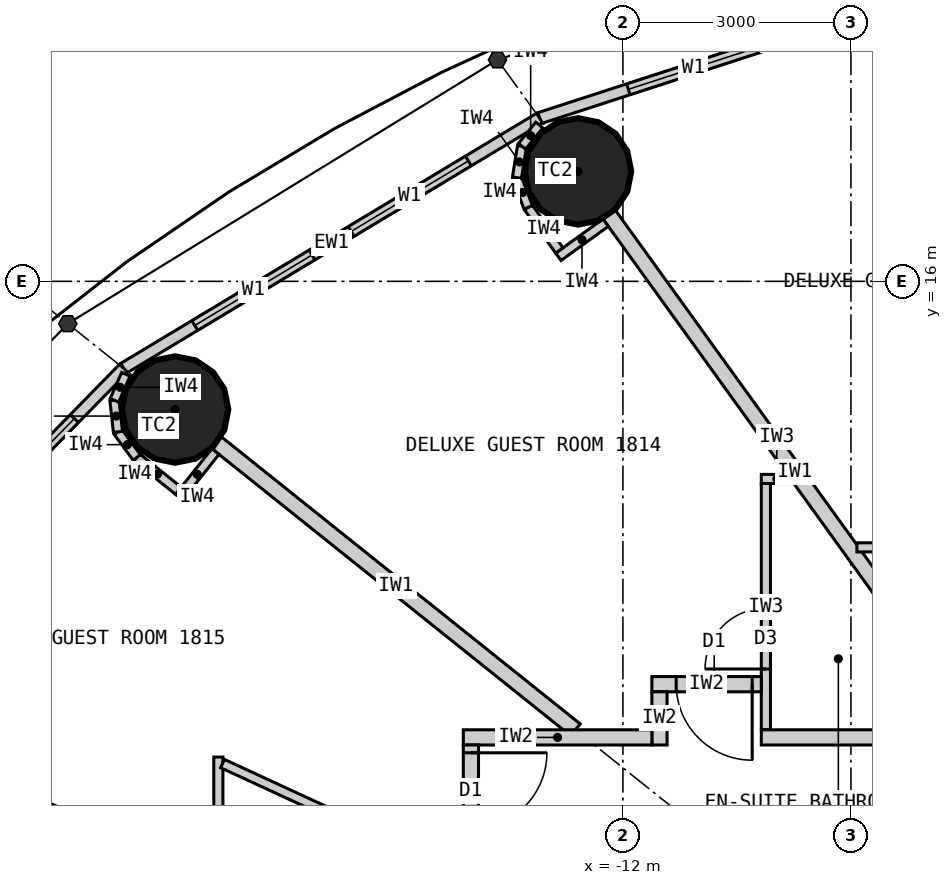
"""IFC4 building model, lengths in metres.
Left out: names, types, materials, properties, quantities, classifications, styles, units other than length and angle.
Written with IfcOpenShell. Run it as: python <this file> out.ifc"""

import sys

from ifc_helpers import new_model, si_unit, direction, frame, frame_2d, origin, origin_2d, place, context, subcontext, project, spatial, rectangle, circle, extrude, element, fill, save


model = new_model("IFC4")
c1 = context("Model", 3, precision=1e-05, world=origin(), true_north=direction((0.0, 1.0)))
c2 = subcontext(c1, "Body", "Model", "MODEL_VIEW")
j1 = project(units=[si_unit("LENGTHUNIT", "METRE"), si_unit("PLANEANGLEUNIT", "RADIAN")], contexts=[c1])
p1 = place(None, origin())
s1 = spatial("IfcSite", under=j1, at=p1, CompositionType="ELEMENT")
p2 = place(p1, origin())
s2 = spatial("IfcBuilding", under=s1, at=p2, CompositionType="ELEMENT")
p3 = place(p2, frame((0.0, 0.0, 73.8)))
s3 = spatial("IfcBuildingStorey", under=s2, at=p3, CompositionType="ELEMENT", Elevation=73.8)
for number, where, z_axis, x_axis in (
    (1, (-12.591, 17.447, 0.0), (0.0, 0.0, 1.0), (1.0, 0.0, 0.0)),
    (2, (-17.892, 14.313, 0.0), (0.0, 0.0, 1.0), (1.0, 0.0, 0.0)),
):
    element("IfcColumn", number, at=place(p3, frame(where, z_axis=z_axis, x_axis=x_axis)), inside=s3, PredefinedType="COLUMN", context=c2, shape_type="SweptSolid", body=[
        extrude(circle(Radius=0.7, at=origin_2d()), origin(), (0.0, 0.0, 1.0), 3.3),
    ])
p4 = place(p3, frame((-6.766, 20.202, 0.0), z_axis=(0.0, 0.0, 1.0), x_axis=(-0.951137534625, -0.308767534285, 0.0)))
e3 = element("IfcWall", 3, at=p4, inside=s3, PredefinedType="ELEMENTEDWALL", context=c2, shape_type="SweptSolid", body=[
    extrude(rectangle(XDim=6.655, YDim=0.15, at=frame_2d((3.328, 0.0))), origin(), (0.0, 0.0, 1.0), 3.12),
])
p5 = place(p4, frame((1.228, 0.0, 0.9)))
e4 = element("IfcOpeningElement", 4, at=p5, cuts=e3, PredefinedType="OPENING", context=c2, shape_type="SweptSolid", body=[
    extrude(rectangle(XDim=1.8, YDim=1.9, at=frame_2d((0.9, 0.95))), frame((0.0, 0.085, 0.0), z_axis=(0.0, -1.0, 0.0), x_axis=(1.0, 0.0, 0.0)), (0.0, 0.0, 1.0), 0.17),
])
p6 = place(p4, frame((3.628, 0.0, 0.9)))
e5 = element("IfcOpeningElement", 5, at=p6, cuts=e3, PredefinedType="OPENING", context=c2, shape_type="SweptSolid", body=[
    extrude(rectangle(XDim=1.8, YDim=1.9, at=frame_2d((0.9, 0.95))), frame((0.0, 0.085, 0.0), z_axis=(0.0, -1.0, 0.0), x_axis=(1.0, 0.0, 0.0)), (0.0, 0.0, 1.0), 0.17),
])
p7 = place(p3, frame((-13.096, 18.147, 0.0), z_axis=(0.0, 0.0, 1.0), x_axis=(-0.856983180864, -0.515344377787, 0.0)))
e6 = element("IfcWall", 6, at=p7, inside=s3, PredefinedType="ELEMENTEDWALL", context=c2, shape_type="SweptSolid", body=[
    extrude(rectangle(XDim=6.386, YDim=0.15, at=frame_2d((3.193, 0.0))), origin(), (0.0, 0.0, 1.0), 3.12),
])
p8 = place(p7, frame((1.093, 0.0, 0.9)))
e7 = element("IfcOpeningElement", 7, at=p8, cuts=e6, PredefinedType="OPENING", context=c2, shape_type="SweptSolid", body=[
    extrude(rectangle(XDim=1.8, YDim=1.9, at=frame_2d((0.9, 0.95))), frame((0.0, 0.085, 0.0), z_axis=(0.0, -1.0, 0.0), x_axis=(1.0, 0.0, 0.0)), (0.0, 0.0, 1.0), 0.17),
])
p9 = place(p7, frame((3.493, 0.0, 0.9)))
e8 = element("IfcOpeningElement", 8, at=p9, cuts=e6, PredefinedType="OPENING", context=c2, shape_type="SweptSolid", body=[
    extrude(rectangle(XDim=1.8, YDim=1.9, at=frame_2d((0.9, 0.95))), frame((0.0, 0.085, 0.0), z_axis=(0.0, -1.0, 0.0), x_axis=(1.0, 0.0, 0.0)), (0.0, 0.0, 1.0), 0.17),
])
p10 = place(p3, frame((-18.57, 14.856, 0.0), z_axis=(0.0, 0.0, 1.0), x_axis=(-0.699602905915, -0.714531856557, 0.0)))
e9 = element("IfcWall", 9, at=p10, inside=s3, PredefinedType="ELEMENTEDWALL", context=c2, shape_type="SweptSolid", body=[
    extrude(rectangle(XDim=6.051, YDim=0.15, at=frame_2d((3.025, 0.0))), origin(), (0.0, 0.0, 1.0), 3.12),
])
p11 = place(p10, frame((0.926, 0.0, 0.9)))
e10 = element("IfcOpeningElement", 10, at=p11, cuts=e9, PredefinedType="OPENING", context=c2, shape_type="SweptSolid", body=[
    extrude(rectangle(XDim=1.8, YDim=1.9, at=frame_2d((0.9, 0.95))), frame((0.0, 0.085, 0.0), z_axis=(0.0, -1.0, 0.0), x_axis=(1.0, 0.0, 0.0)), (0.0, 0.0, 1.0), 0.17),
])
p12 = place(p10, frame((3.325, 0.0, 0.9)))
e11 = element("IfcOpeningElement", 11, at=p12, cuts=e9, PredefinedType="OPENING", context=c2, shape_type="SweptSolid", body=[
    extrude(rectangle(XDim=1.8, YDim=1.9, at=frame_2d((0.9, 0.95))), frame((0.0, 0.085, 0.0), z_axis=(0.0, -1.0, 0.0), x_axis=(1.0, 0.0, 0.0)), (0.0, 0.0, 1.0), 0.17),
])
p13 = place(p3, frame((-7.289, 10.1, 0.0), z_axis=(0.0, 0.0, 1.0), x_axis=(-0.585198353053, 0.810890182197, 0.0)))
e12 = element("IfcWall", 12, at=p13, inside=s3, PredefinedType="PARTITIONING", context=c2, shape_type="SweptSolid", body=[
    extrude(rectangle(XDim=8.36, YDim=0.2, at=frame_2d((4.18, 0.0))), origin(), (0.0, 0.0, 1.0), 2.32),
])
p14 = place(p3, frame((-12.625, 10.1, 0.0), z_axis=(0.0, 0.0, 1.0), x_axis=(-0.780892451574, 0.624665493744, 0.0)))
e13 = element("IfcWall", 13, at=p14, inside=s3, PredefinedType="PARTITIONING", context=c2, shape_type="SweptSolid", body=[
    extrude(rectangle(XDim=6.045, YDim=0.2, at=frame_2d((3.022, 0.0))), origin(), (0.0, 0.0, 1.0), 2.32),
])
p15 = place(p3, frame((-14.1, 6.512, 0.0), z_axis=(0.0, 0.0, 1.0), x_axis=(-0.907832871056, 0.419332181247, 0.0)))
e14 = element("IfcWall", 14, at=p15, inside=s3, PredefinedType="PARTITIONING", context=c2, shape_type="SweptSolid", body=[
    extrude(rectangle(XDim=8.023, YDim=0.2, at=frame_2d((4.011, 0.0))), origin(), (0.0, 0.0, 1.0), 2.32),
])
p16 = place(p3, frame((-8.921, 12.5, 0.0), z_axis=(0.0, 0.0, 1.0), x_axis=(1.0, 0.0, 0.0)))
e15 = element("IfcWall", 15, at=p16, inside=s3, PredefinedType="PARTITIONING", context=c2, shape_type="SweptSolid", body=[
    extrude(rectangle(XDim=3.372, YDim=0.12, at=frame_2d((1.686, 0.0))), origin(), (0.0, 0.0, 1.0), 3.12),
])
p17 = place(p3, frame((-9.771, 13.4, 0.0), z_axis=(0.0, 0.0, 1.0), x_axis=(-1.0, 0.0, 0.0)))
e16 = element("IfcWall", 16, at=p17, inside=s3, PredefinedType="PARTITIONING", context=c2, shape_type="SweptSolid", body=[
    extrude(rectangle(XDim=0.408, YDim=0.12, at=frame_2d((0.204, 0.0))), origin(), (0.0, 0.0, 1.0), 3.12),
])
p18 = place(p3, frame((-10.119, 10.1, 0.0), z_axis=(0.0, 0.0, 1.0), x_axis=(0.0, 1.0, 0.0)))
e17 = element("IfcWall", 17, at=p18, inside=s3, PredefinedType="PARTITIONING", context=c2, shape_type="SweptSolid", body=[
    extrude(rectangle(XDim=3.24, YDim=0.12, at=frame_2d((1.62, 0.0))), origin(), (0.0, 0.0, 1.0), 3.12),
])
p19 = place(p18, frame((0.8, 0.0, 0.0)))
e18 = element("IfcOpeningElement", 18, at=p19, cuts=e17, PredefinedType="OPENING", context=c2, shape_type="SweptSolid", body=[
    extrude(rectangle(XDim=0.8, YDim=2.1, at=frame_2d((0.4, 1.05))), frame((0.0, 0.07, 0.0), z_axis=(0.0, -1.0, 0.0), x_axis=(1.0, 0.0, 0.0)), (0.0, 0.0, 1.0), 0.14),
])
p20 = place(p3, frame((-17.323, 8.101, 0.0), z_axis=(0.0, 0.0, 1.0), x_axis=(0.0, 1.0, 0.0)))
e19 = element("IfcWall", 19, at=p20, inside=s3, PredefinedType="PARTITIONING", context=c2, shape_type="SweptSolid", body=[
    extrude(rectangle(XDim=1.64, YDim=0.12, at=frame_2d((0.82, 0.0))), origin(), (0.0, 0.0, 1.0), 3.12),
])
p21 = place(p3, frame((-14.1, 8.193, 0.0), z_axis=(0.0, 0.0, 1.0), x_axis=(-0.907836493557, 0.419324338628, 0.0)))
e20 = element("IfcWall", 20, at=p21, inside=s3, PredefinedType="PARTITIONING", context=c2, shape_type="SweptSolid", body=[
    extrude(rectangle(XDim=3.49, YDim=0.12, at=frame_2d((1.745, 0.0))), origin(), (0.0, 0.0, 1.0), 3.12),
])
p22 = place(p21, frame((0.75, 0.0, 0.0)))
e21 = element("IfcOpeningElement", 21, at=p22, cuts=e20, PredefinedType="OPENING", context=c2, shape_type="SweptSolid", body=[
    extrude(rectangle(XDim=0.8, YDim=2.1, at=frame_2d((0.4, 1.05))), frame((0.0, 0.07, 0.0), z_axis=(0.0, -1.0, 0.0), x_axis=(1.0, 0.0, 0.0)), (0.0, 0.0, 1.0), 0.14),
])
p23 = place(p3, frame((-11.619, 10.7, 0.0), z_axis=(0.0, 0.0, 1.0), x_axis=(1.0, 0.0, 0.0)))
e22 = element("IfcWall", 22, at=p23, inside=s3, PredefinedType="PARTITIONING", context=c2, shape_type="SweptSolid", body=[
    extrude(rectangle(XDim=1.44, YDim=0.2, at=frame_2d((0.72, 0.0))), origin(), (0.0, 0.0, 1.0), 3.12),
])
p24 = place(p23, frame((0.32, 0.0, 0.0)))
e23 = element("IfcOpeningElement", 23, at=p24, cuts=e22, PredefinedType="OPENING", context=c2, shape_type="SweptSolid", body=[
    extrude(rectangle(XDim=1.0, YDim=2.2, at=frame_2d((0.5, 1.1))), frame((0.0, 0.11, 0.0), z_axis=(0.0, -1.0, 0.0), x_axis=(1.0, 0.0, 0.0)), (0.0, 0.0, 1.0), 0.22),
])
p25 = place(p3, frame((-11.519, 9.9, 0.0), z_axis=(0.0, 0.0, 1.0), x_axis=(0.0, 1.0, 0.0)))
e24 = element("IfcWall", 24, at=p25, inside=s3, PredefinedType="PARTITIONING", context=c2, shape_type="SweptSolid", body=[
    extrude(rectangle(XDim=0.7, YDim=0.2, at=frame_2d((0.35, 0.0))), origin(), (0.0, 0.0, 1.0), 3.12),
])
p26 = place(p3, frame((-14.1, 10.0, 0.0), z_axis=(0.0, 0.0, 1.0), x_axis=(1.0, 0.0, 0.0)))
e25 = element("IfcWall", 25, at=p26, inside=s3, PredefinedType="PARTITIONING", context=c2, shape_type="SweptSolid", body=[
    extrude(rectangle(XDim=2.481, YDim=0.2, at=frame_2d((1.24, 0.0))), origin(), (0.0, 0.0, 1.0), 3.12),
])
p27 = place(p3, frame((-10.179, 10.0, 0.0), z_axis=(0.0, 0.0, 1.0), x_axis=(1.0, 0.0, 0.0)))
e26 = element("IfcWall", 26, at=p27, inside=s3, PredefinedType="PARTITIONING", context=c2, shape_type="SweptSolid", body=[
    extrude(rectangle(XDim=4.63, YDim=0.2, at=frame_2d((2.315, 0.0))), origin(), (0.0, 0.0, 1.0), 3.12),
])
p28 = place(p3, frame((-14.0, 9.9, 0.0), z_axis=(0.0, 0.0, 1.0), x_axis=(0.0, -1.0, 0.0)))
e27 = element("IfcWall", 27, at=p28, inside=s3, PredefinedType="PARTITIONING", context=c2, shape_type="SweptSolid", body=[
    extrude(rectangle(XDim=5.127, YDim=0.2, at=frame_2d((2.564, 0.0))), origin(), (0.0, 0.0, 1.0), 3.12),
])
p29 = place(p28, frame((0.103, 0.0, 0.0)))
e28 = element("IfcOpeningElement", 28, at=p29, cuts=e27, PredefinedType="OPENING", context=c2, shape_type="SweptSolid", body=[
    extrude(rectangle(XDim=1.0, YDim=2.2, at=frame_2d((0.5, 1.1))), frame((0.0, 0.11, 0.0), z_axis=(0.0, -1.0, 0.0), x_axis=(1.0, 0.0, 0.0)), (0.0, 0.0, 1.0), 0.22),
])
p30 = place(p3, frame((-12.227, 16.772, 0.0), z_axis=(0.0, 0.0, 1.0), x_axis=(-0.810821798253, -0.585293098778, 0.0)))
e29 = element("IfcWall", 29, at=p30, inside=s3, PredefinedType="PARTITIONING", context=c2, shape_type="SweptSolid", body=[
    extrude(rectangle(XDim=0.768, YDim=0.12, at=frame_2d((0.384, 0.0))), origin(), (0.0, 0.0, 1.0), 3.12),
])
p31 = place(p3, frame((-12.836, 16.406, 0.0), z_axis=(0.0, 0.0, 1.0), x_axis=(-0.585223113993, 0.810872312296, 0.0)))
e30 = element("IfcWall", 30, at=p31, inside=s3, PredefinedType="PARTITIONING", context=c2, shape_type="SweptSolid", body=[
    extrude(rectangle(XDim=0.7, YDim=0.12, at=frame_2d((0.35, 0.0))), origin(), (0.0, 0.0, 1.0), 3.12),
])
p32 = place(p3, frame((-13.246, 16.974, 0.0), z_axis=(0.0, 0.0, 1.0), x_axis=(-0.355728122235, 0.934589483705, 0.0)))
e31 = element("IfcWall", 31, at=p32, inside=s3, PredefinedType="PARTITIONING", context=c2, shape_type="SweptSolid", body=[
    extrude(rectangle(XDim=0.418, YDim=0.12, at=frame_2d((0.209, 0.0))), origin(), (0.0, 0.0, 1.0), 3.12),
])
p33 = place(p3, frame((-13.394, 17.365, 0.0), z_axis=(0.0, 0.0, 1.0), x_axis=(0.159379276926, 0.987217425943, 0.0)))
e32 = element("IfcWall", 32, at=p33, inside=s3, PredefinedType="PARTITIONING", context=c2, shape_type="SweptSolid", body=[
    extrude(rectangle(XDim=0.418, YDim=0.12, at=frame_2d((0.209, 0.0))), origin(), (0.0, 0.0, 1.0), 3.12),
])
p34 = place(p3, frame((-13.328, 17.777, 0.0), z_axis=(0.0, 0.0, 1.0), x_axis=(0.632276783541, 0.774742582407, 0.0)))
e33 = element("IfcWall", 33, at=p34, inside=s3, PredefinedType="PARTITIONING", context=c2, shape_type="SweptSolid", body=[
    extrude(rectangle(XDim=0.36, YDim=0.12, at=frame_2d((0.18, 0.0))), origin(), (0.0, 0.0, 1.0), 3.12),
])
p35 = place(p3, frame((-17.361, 13.76, 0.0), z_axis=(0.0, 0.0, 1.0), x_axis=(-0.624501042889, -0.781023973659, 0.0)))
e34 = element("IfcWall", 34, at=p35, inside=s3, PredefinedType="PARTITIONING", context=c2, shape_type="SweptSolid", body=[
    extrude(rectangle(XDim=0.767, YDim=0.12, at=frame_2d((0.384, 0.0))), origin(), (0.0, 0.0, 1.0), 3.12),
])
p36 = place(p3, frame((-17.85, 13.246, 0.0), z_axis=(0.0, 0.0, 1.0), x_axis=(-0.780902834923, 0.62465251333, 0.0)))
e35 = element("IfcWall", 35, at=p36, inside=s3, PredefinedType="PARTITIONING", context=c2, shape_type="SweptSolid", body=[
    extrude(rectangle(XDim=0.7, YDim=0.12, at=frame_2d((0.35, 0.0))), origin(), (0.0, 0.0, 1.0), 3.12),
])
for number, where, z_axis, x_axis in (
    (36, (-18.396, 13.683, 0.0), (0.0, 0.0, 1.0), (-0.592, 0.806, 0.0)),
    (37, (-18.644, 14.02, 0.0), (0.0, 0.0, 1.0), (-0.11, 0.994, 0.0)),
):
    element("IfcWall", number, at=place(p3, frame(where, z_axis=z_axis, x_axis=x_axis)), inside=s3, PredefinedType="PARTITIONING", context=c2, shape_type="SweptSolid", body=[
        extrude(rectangle(XDim=0.418, YDim=0.12, at=frame_2d((0.209, 0.0))), origin(), (0.0, 0.0, 1.0), 3.12),
    ])
p37 = place(p3, frame((-18.69, 14.435, 0.0), z_axis=(0.0, 0.0, 1.0), x_axis=(0.401093412634, 0.91603715773, 0.0)))
e38 = element("IfcWall", 38, at=p37, inside=s3, PredefinedType="PARTITIONING", context=c2, shape_type="SweptSolid", body=[
    extrude(rectangle(XDim=0.373, YDim=0.12, at=frame_2d((0.187, 0.0))), origin(), (0.0, 0.0, 1.0), 3.12),
])
p38 = place(p6, origin())
e39 = element("IfcWindow", 39, at=p38, inside=s3, PartitioningType="SINGLE_PANEL", PredefinedType="WINDOW", context=c2, shape_type="SweptSolid", body=[
    extrude(rectangle(XDim=1.8, YDim=1.9, at=frame_2d((0.9, 0.95))), frame((0.0, 0.03, 0.0), z_axis=(0.0, -1.0, 0.0), x_axis=(1.0, 0.0, 0.0)), (0.0, 0.0, 1.0), 0.06),
])
fill(e5, e39)
p39 = place(p8, origin())
e40 = element("IfcWindow", 40, at=p39, inside=s3, PartitioningType="SINGLE_PANEL", PredefinedType="WINDOW", context=c2, shape_type="SweptSolid", body=[
    extrude(rectangle(XDim=1.8, YDim=1.9, at=frame_2d((0.9, 0.95))), frame((0.0, 0.03, 0.0), z_axis=(0.0, -1.0, 0.0), x_axis=(1.0, 0.0, 0.0)), (0.0, 0.0, 1.0), 0.06),
])
fill(e7, e40)
p40 = place(p9, origin())
e41 = element("IfcWindow", 41, at=p40, inside=s3, PartitioningType="SINGLE_PANEL", PredefinedType="WINDOW", context=c2, shape_type="SweptSolid", body=[
    extrude(rectangle(XDim=1.8, YDim=1.9, at=frame_2d((0.9, 0.95))), frame((0.0, 0.03, 0.0), z_axis=(0.0, -1.0, 0.0), x_axis=(1.0, 0.0, 0.0)), (0.0, 0.0, 1.0), 0.06),
])
fill(e8, e41)
p41 = place(p11, origin())
e42 = element("IfcWindow", 42, at=p41, inside=s3, PartitioningType="SINGLE_PANEL", PredefinedType="WINDOW", context=c2, shape_type="SweptSolid", body=[
    extrude(rectangle(XDim=1.8, YDim=1.9, at=frame_2d((0.9, 0.95))), frame((0.0, 0.03, 0.0), z_axis=(0.0, -1.0, 0.0), x_axis=(1.0, 0.0, 0.0)), (0.0, 0.0, 1.0), 0.06),
])
fill(e10, e42)
p42 = place(p19, origin())
e43 = element("IfcDoor", 43, at=p42, inside=s3, OperationType="SINGLE_SWING_LEFT", PredefinedType="DOOR", context=c2, shape_type="SweptSolid", body=[
    extrude(rectangle(XDim=0.8, YDim=2.1, at=frame_2d((0.4, 1.05))), frame((0.0, 0.025, 0.0), z_axis=(0.0, -1.0, 0.0), x_axis=(1.0, 0.0, 0.0)), (0.0, 0.0, 1.0), 0.05),
])
fill(e18, e43)
p43 = place(p24, origin())
e44 = element("IfcDoor", 44, at=p43, inside=s3, OperationType="SINGLE_SWING_RIGHT", PredefinedType="DOOR", context=c2, shape_type="SweptSolid", body=[
    extrude(rectangle(XDim=1.0, YDim=2.2, at=frame_2d((0.5, 1.1))), frame((0.0, 0.025, 0.0), z_axis=(0.0, -1.0, 0.0), x_axis=(1.0, 0.0, 0.0)), (0.0, 0.0, 1.0), 0.05),
])
fill(e23, e44)
p44 = place(p29, origin())
e45 = element("IfcDoor", 45, at=p44, inside=s3, OperationType="SINGLE_SWING_LEFT", PredefinedType="DOOR", context=c2, shape_type="SweptSolid", body=[
    extrude(rectangle(XDim=1.0, YDim=2.2, at=frame_2d((0.5, 1.1))), frame((0.0, 0.025, 0.0), z_axis=(0.0, -1.0, 0.0), x_axis=(1.0, 0.0, 0.0)), (0.0, 0.0, 1.0), 0.05),
])
fill(e28, e45)
save(model, sys.argv[1])
